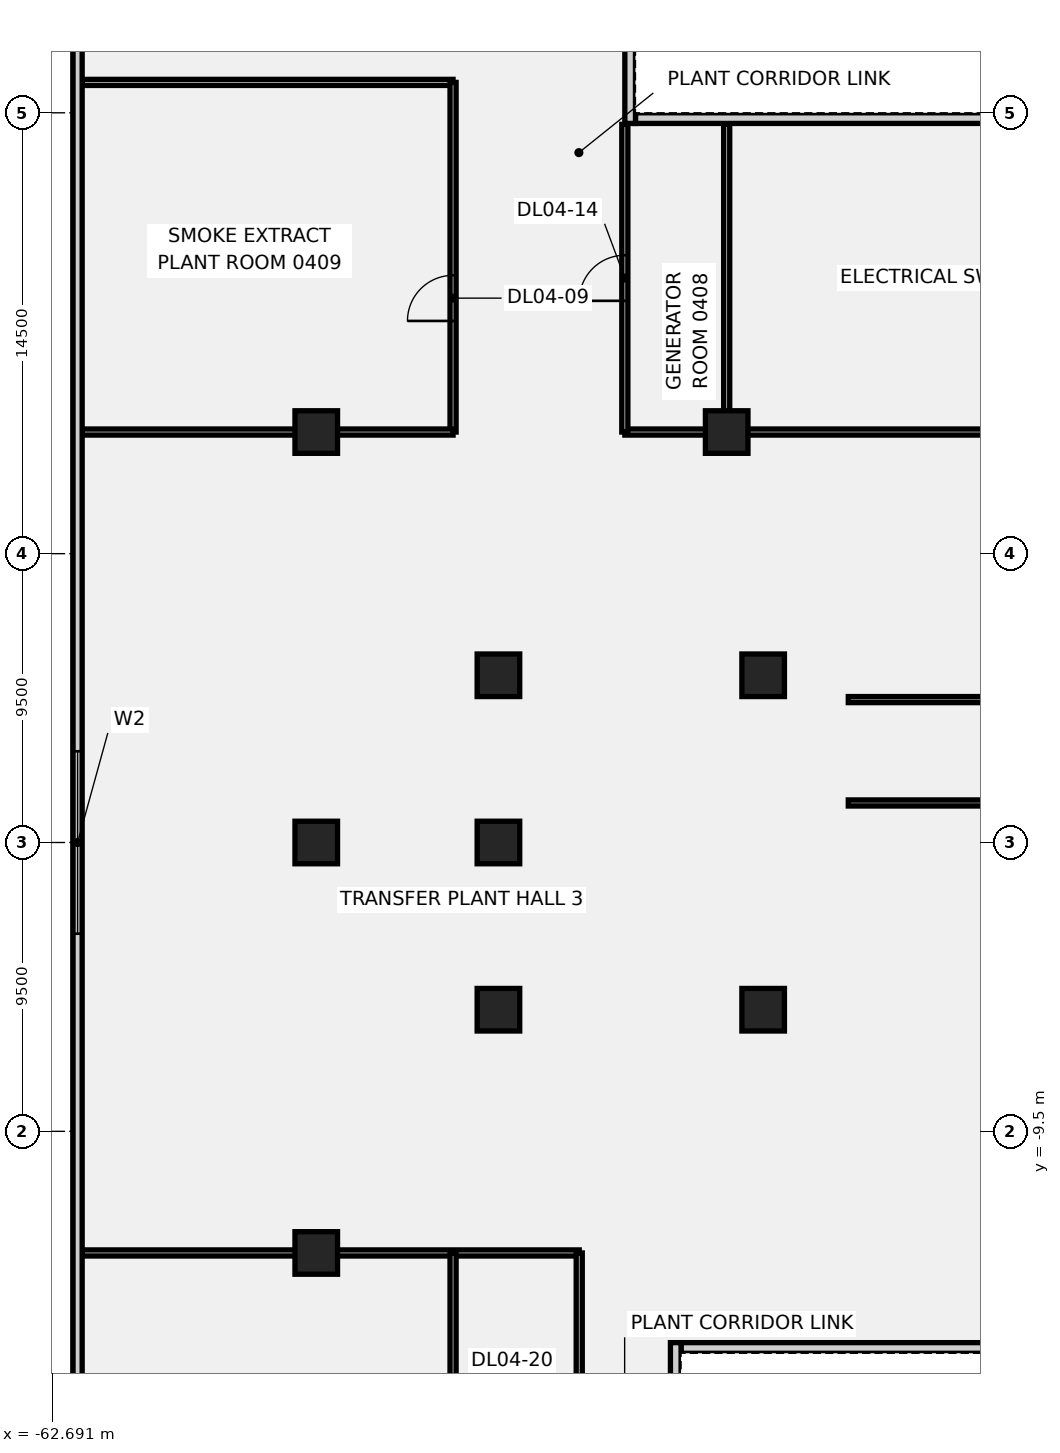
"""IFC4 building model, lengths in metres.
Left out: names, types, materials, properties, quantities, classifications, styles, units other than length and angle.
Written with IfcOpenShell. Run it as: python <this file> out.ifc"""

import sys

from ifc_helpers import new_model, si_unit, direction, frame, frame_2d, origin, origin_2d, place, context, subcontext, project, spatial, polyline, rectangle, outline, extrude, element, fill, save


model = new_model("IFC4")
c1 = context("Model", 3, precision=1e-05, world=origin(), true_north=direction((0.0, 1.0)))
c2 = subcontext(c1, "Body", "Model", "MODEL_VIEW")
j1 = project(units=[si_unit("LENGTHUNIT", "METRE"), si_unit("PLANEANGLEUNIT", "RADIAN")], contexts=[c1])
p1 = place(None, origin())
s1 = spatial("IfcSite", under=j1, at=p1, CompositionType="ELEMENT")
p2 = place(p1, origin())
s2 = spatial("IfcBuilding", under=s1, at=p2, CompositionType="ELEMENT")
p3 = place(p2, frame((0.0, 0.0, 25.0)))
s3 = spatial("IfcBuildingStorey", under=s2, at=p3, CompositionType="ELEMENT", Elevation=25.0)
for number, where, z_axis, x_axis in (
    (1, (-39.3, -5.5, -0.45), (0.0, 0.0, 1.0), (1.0, 0.0, 0.0)),
    (2, (-39.3, 5.5, -0.45), (0.0, 0.0, 1.0), (1.0, 0.0, 0.0)),
    (3, (-48.008, 5.5, -0.45), (0.0, 0.0, 1.0), (1.0, 0.0, 0.0)),
    (4, (-48.008, 0.0, -0.45), (0.0, 0.0, 1.0), (1.0, 0.0, 0.0)),
    (5, (-48.008, -5.5, -0.45), (0.0, 0.0, 1.0), (1.0, 0.0, 0.0)),
    (6, (-54.0, -13.5, -0.45), (0.0, 0.0, 1.0), (1.0, 0.0, 0.0)),
    (7, (-54.0, 0.0, -0.45), (0.0, 0.0, 1.0), (1.0, 0.0, 0.0)),
    (8, (-54.0, 13.5, -0.45), (0.0, 0.0, 1.0), (1.0, 0.0, 0.0)),
    (9, (-40.5, 13.5, -0.45), (0.0, 0.0, 1.0), (1.0, 0.0, 0.0)),
):
    element("IfcColumn", number, at=place(p3, frame(where, z_axis=z_axis, x_axis=x_axis)), inside=s3, PredefinedType="COLUMN", context=c2, shape_type="SweptSolid", body=[
        extrude(rectangle(XDim=1.4, YDim=1.4, at=origin_2d()), origin(), (0.0, 0.0, 1.0), 4.35),
    ])
p4 = place(p3, frame((-61.699, -13.5, 0.0), z_axis=(0.0, 0.0, 1.0), x_axis=(1.0, 0.0, 0.0)))
e10 = element("IfcWall", 10, at=p4, inside=s3, PredefinedType="PARTITIONING", context=c2, shape_type="SweptSolid", body=[
    extrude(rectangle(XDim=16.349, YDim=0.2, at=frame_2d((8.174, 0.0))), origin(), (0.0, 0.0, 1.0), 3.9),
])
p5 = place(p3, frame((-61.699, 25.0, 0.0), z_axis=(0.0, 0.0, 1.0), x_axis=(1.0, 0.0, 0.0)))
e11 = element("IfcWall", 11, at=p5, inside=s3, PredefinedType="PARTITIONING", context=c2, shape_type="SweptSolid", body=[
    extrude(rectangle(XDim=12.199, YDim=0.2, at=frame_2d((6.1, 0.0))), origin(), (0.0, 0.0, 1.0), 3.9),
])
p6 = place(p3, frame((-49.5, 13.5, 0.0), z_axis=(0.0, 0.0, 1.0), x_axis=(0.0, 1.0, 0.0)))
e12 = element("IfcWall", 12, at=p6, inside=s3, PredefinedType="PARTITIONING", context=c2, shape_type="SweptSolid", body=[
    extrude(rectangle(XDim=11.5, YDim=0.2, at=frame_2d((5.75, 0.0))), origin(), (0.0, 0.0, 1.0), 3.9),
])
p7 = place(p6, frame((3.654, 0.0, 0.0)))
e13 = element("IfcOpeningElement", 13, at=p7, cuts=e12, PredefinedType="OPENING", context=c2, shape_type="SweptSolid", body=[
    extrude(rectangle(XDim=1.5, YDim=2.1, at=frame_2d((0.75, 1.05))), frame((0.0, 0.11, 0.0), z_axis=(0.0, -1.0, 0.0), x_axis=(1.0, 0.0, 0.0)), (0.0, 0.0, 1.0), 0.22),
])
p8 = place(p3, frame((-61.699, 13.5, 0.0), z_axis=(0.0, 0.0, 1.0), x_axis=(1.0, 0.0, 0.0)))
e14 = element("IfcWall", 14, at=p8, inside=s3, PredefinedType="PARTITIONING", context=c2, shape_type="SweptSolid", body=[
    extrude(rectangle(XDim=12.199, YDim=0.2, at=frame_2d((6.1, 0.0))), origin(), (0.0, 0.0, 1.0), 3.9),
])
p9 = place(p3, frame((-49.5, -25.0, 0.0), z_axis=(0.0, 0.0, 1.0), x_axis=(0.0, 1.0, 0.0)))
e15 = element("IfcWall", 15, at=p9, inside=s3, PredefinedType="PARTITIONING", context=c2, shape_type="SweptSolid", body=[
    extrude(rectangle(XDim=11.5, YDim=0.2, at=frame_2d((5.75, 0.0))), origin(), (0.0, 0.0, 1.0), 3.9),
])
p10 = place(p3, frame((-45.35, -25.0, 0.0), z_axis=(0.0, 0.0, 1.0), x_axis=(0.0, 1.0, 0.0)))
e16 = element("IfcWall", 16, at=p10, inside=s3, PredefinedType="PARTITIONING", context=c2, shape_type="SweptSolid", body=[
    extrude(rectangle(XDim=11.5, YDim=0.2, at=frame_2d((5.75, 0.0))), origin(), (0.0, 0.0, 1.0), 3.9),
])
p11 = place(p10, frame((5.0, 0.0, 0.0)))
e17 = element("IfcOpeningElement", 17, at=p11, cuts=e16, PredefinedType="OPENING", context=c2, shape_type="SweptSolid", body=[
    extrude(rectangle(XDim=1.5, YDim=2.1, at=frame_2d((0.75, 1.05))), frame((0.0, 0.11, 0.0), z_axis=(0.0, -1.0, 0.0), x_axis=(1.0, 0.0, 0.0)), (0.0, 0.0, 1.0), 0.22),
])
p12 = place(p3, frame((-43.85, 13.5, 0.0), z_axis=(0.0, 0.0, 1.0), x_axis=(1.0, 0.0, 0.0)))
e18 = element("IfcWall", 18, at=p12, inside=s3, PredefinedType="PARTITIONING", context=c2, shape_type="SweptSolid", body=[
    extrude(rectangle(XDim=21.35, YDim=0.2, at=frame_2d((10.675, 0.0))), origin(), (0.0, 0.0, 1.0), 3.9),
])
p13 = place(p3, frame((-43.85, 13.5, 0.0), z_axis=(0.0, 0.0, 1.0), x_axis=(0.0, 1.0, 0.0)))
e19 = element("IfcWall", 19, at=p13, inside=s3, PredefinedType="PARTITIONING", context=c2, shape_type="SweptSolid", body=[
    extrude(rectangle(XDim=10.12, YDim=0.2, at=frame_2d((5.06, 0.0))), origin(), (0.0, 0.0, 1.0), 3.9),
])
p14 = place(p13, frame((4.315, 0.0, 0.0)))
e20 = element("IfcOpeningElement", 20, at=p14, cuts=e19, PredefinedType="OPENING", context=c2, shape_type="SweptSolid", body=[
    extrude(rectangle(XDim=1.5, YDim=2.1, at=frame_2d((0.75, 1.05))), frame((0.0, 0.11, 0.0), z_axis=(0.0, -1.0, 0.0), x_axis=(1.0, 0.0, 0.0)), (0.0, 0.0, 1.0), 0.22),
])
p15 = place(p3, frame((-40.5, 13.5, 0.0), z_axis=(0.0, 0.0, 1.0), x_axis=(0.0, 1.0, 0.0)))
e21 = element("IfcWall", 21, at=p15, inside=s3, PredefinedType="PARTITIONING", context=c2, shape_type="SweptSolid", body=[
    extrude(rectangle(XDim=10.12, YDim=0.2, at=frame_2d((5.06, 0.0))), origin(), (0.0, 0.0, 1.0), 3.9),
])
p16 = place(p3, frame((-61.85, 50.988, 0.0), z_axis=(0.0, 0.0, 1.0), x_axis=(0.0, -1.0, 0.0)))
e22 = element("IfcWall", 22, at=p16, inside=s3, PredefinedType="SOLIDWALL", context=c2, shape_type="SweptSolid", body=[
    extrude(rectangle(XDim=101.977, YDim=0.3, at=frame_2d((50.988, 0.0))), origin(), (0.0, 0.0, 1.0), 3.9),
])
p17 = place(p16, frame((47.988, 0.0, 1.4)))
e23 = element("IfcOpeningElement", 23, at=p17, cuts=e22, PredefinedType="OPENING", context=c2, shape_type="SweptSolid", body=[
    extrude(rectangle(XDim=6.0, YDim=2.2, at=frame_2d((3.0, 1.1))), frame((0.0, 0.16, 0.0), z_axis=(0.0, -1.0, 0.0), x_axis=(1.0, 0.0, 0.0)), (0.0, 0.0, 1.0), 0.32),
])
p18 = place(p3, frame((-43.5, 23.825, 0.0), z_axis=(0.0, 0.0, 1.0), x_axis=(1.0, 0.0, 0.0)))
e24 = element("IfcWall", 24, at=p18, inside=s3, PredefinedType="SOLIDWALL", context=c2, shape_type="SweptSolid", body=[
    extrude(rectangle(XDim=26.7, YDim=0.35, at=frame_2d((13.35, 0.0))), origin(), (0.0, 0.0, 1.0), 3.9),
])
p19 = place(p3, frame((-43.675, 23.65, 0.0), z_axis=(0.0, 0.0, 1.0), x_axis=(0.0, 1.0, 0.0)))
e25 = element("IfcWall", 25, at=p19, inside=s3, PredefinedType="SOLIDWALL", context=c2, shape_type="SweptSolid", body=[
    extrude(rectangle(XDim=18.7, YDim=0.35, at=frame_2d((9.35, 0.0))), origin(), (0.0, 0.0, 1.0), 3.9),
])
p20 = place(p19, frame((14.9, 0.0, 1.0)))
e26 = element("IfcOpeningElement", 26, at=p20, cuts=e25, PredefinedType="OPENING", context=c2, shape_type="SweptSolid", body=[
    extrude(rectangle(XDim=2.4, YDim=1.8, at=frame_2d((1.2, 0.9))), frame((0.0, 0.185, 0.0), z_axis=(0.0, -1.0, 0.0), x_axis=(1.0, 0.0, 0.0)), (0.0, 0.0, 1.0), 0.37),
])
p21 = place(p3, frame((-42.0, -16.625, 0.0), z_axis=(0.0, 0.0, 1.0), x_axis=(1.0, 0.0, 0.0)))
e27 = element("IfcWall", 27, at=p21, inside=s3, PredefinedType="SOLIDWALL", context=c2, shape_type="SweptSolid", body=[
    extrude(rectangle(XDim=18.0, YDim=0.35, at=frame_2d((9.0, 0.0))), origin(), (0.0, 0.0, 1.0), 3.9),
])
p22 = place(p3, frame((-42.175, -43.85, 0.0), z_axis=(0.0, 0.0, 1.0), x_axis=(0.0, 1.0, 0.0)))
e28 = element("IfcWall", 28, at=p22, inside=s3, PredefinedType="SOLIDWALL", context=c2, shape_type="SweptSolid", body=[
    extrude(rectangle(XDim=27.4, YDim=0.35, at=frame_2d((13.7, 0.0))), origin(), (0.0, 0.0, 1.0), 3.9),
])
p23 = place(p3, frame((-29.8, 1.3, 0.0), z_axis=(0.0, 0.0, 1.0), x_axis=(-1.0, 0.0, 0.0)))
e29 = element("IfcWall", 29, at=p23, inside=s3, PredefinedType="SHEAR", context=c2, shape_type="SweptSolid", body=[
    extrude(rectangle(XDim=6.7, YDim=0.2, at=frame_2d((3.35, 0.0))), origin(), (0.0, 0.0, 1.0), 3.9),
])
p24 = place(p23, frame((0.35, 0.0, 0.0)))
e30 = element("IfcOpeningElement", 30, at=p24, cuts=e29, PredefinedType="OPENING", context=c2, shape_type="SweptSolid", body=[
    extrude(rectangle(XDim=1.0, YDim=2.1, at=frame_2d((0.5, 1.05))), frame((0.0, 0.11, 0.0), z_axis=(0.0, -1.0, 0.0), x_axis=(1.0, 0.0, 0.0)), (0.0, 0.0, 1.0), 0.22),
])
p25 = place(p3, frame((-29.8, 4.7, 0.0), z_axis=(0.0, 0.0, 1.0), x_axis=(-1.0, 0.0, 0.0)))
e31 = element("IfcWall", 31, at=p25, inside=s3, PredefinedType="SHEAR", context=c2, shape_type="SweptSolid", body=[
    extrude(rectangle(XDim=6.7, YDim=0.2, at=frame_2d((3.35, 0.0))), origin(), (0.0, 0.0, 1.0), 3.9),
])
p26 = place(p3, origin())
e32 = element("IfcWall", 32, at=p26, inside=s3, PredefinedType="SHEAR", context=c2, shape_type="SweptSolid", body=[
    extrude(outline(polyline([(-36.3, 4.6), (-36.5, 4.6), (-36.5, 1.4), (-36.3, 1.4), (-36.3, 4.6)])), origin(), (0.0, 0.0, 1.0), 3.9),
])
p27 = place(p7, origin())
e33 = element("IfcDoor", 33, at=p27, inside=s3, OperationType="SINGLE_SWING_LEFT", PredefinedType="DOOR", context=c2, shape_type="SweptSolid", body=[
    extrude(rectangle(XDim=1.5, YDim=2.1, at=frame_2d((0.75, 1.05))), frame((0.0, 0.025, 0.0), z_axis=(0.0, -1.0, 0.0), x_axis=(1.0, 0.0, 0.0)), (0.0, 0.0, 1.0), 0.05),
])
fill(e13, e33)
p28 = place(p14, origin())
e34 = element("IfcDoor", 34, at=p28, inside=s3, OperationType="SINGLE_SWING_RIGHT", PredefinedType="DOOR", context=c2, shape_type="SweptSolid", body=[
    extrude(rectangle(XDim=1.5, YDim=2.1, at=frame_2d((0.75, 1.05))), frame((0.0, 0.025, 0.0), z_axis=(0.0, -1.0, 0.0), x_axis=(1.0, 0.0, 0.0)), (0.0, 0.0, 1.0), 0.05),
])
fill(e20, e34)
p29 = place(p17, origin())
e35 = element("IfcWindow", 35, at=p29, inside=s3, PartitioningType="SINGLE_PANEL", PredefinedType="WINDOW", context=c2, shape_type="SweptSolid", body=[
    extrude(rectangle(XDim=6.0, YDim=2.2, at=frame_2d((3.0, 1.1))), frame((0.0, 0.03, 0.0), z_axis=(0.0, -1.0, 0.0), x_axis=(1.0, 0.0, 0.0)), (0.0, 0.0, 1.0), 0.06),
])
fill(e23, e35)
save(model, sys.argv[1])
